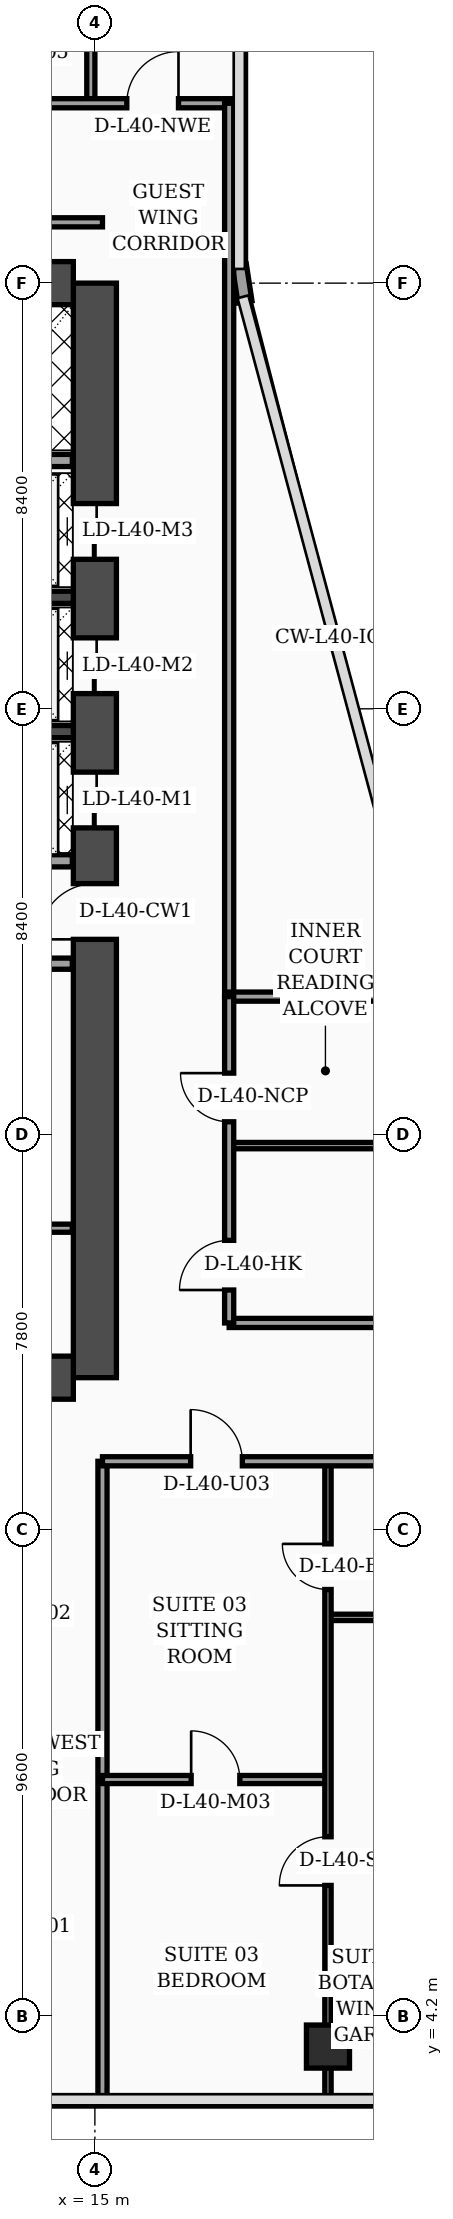
"""IFC4 building model, lengths in metres.
Left out: names, types, materials, properties, quantities, classifications, styles, units other than length and angle.
Written with IfcOpenShell. Run it as: python <this file> out.ifc"""

import sys

from ifc_helpers import new_model, si_unit, direction, frame, frame_2d, origin, origin_2d, place, context, subcontext, project, spatial, rectangle, hollow_rectangle, extrude, element, fill, save


model = new_model("IFC4")
c1 = context("Model", 3, precision=1e-05, world=origin(), true_north=direction((0.0, 1.0)))
c2 = subcontext(c1, "Body", "Model", "MODEL_VIEW")
j1 = project(units=[si_unit("LENGTHUNIT", "METRE"), si_unit("PLANEANGLEUNIT", "RADIAN")], contexts=[c1])
p1 = place(None, origin())
s1 = spatial("IfcSite", under=j1, at=p1, CompositionType="ELEMENT")
p2 = place(p1, origin())
s2 = spatial("IfcBuilding", under=s1, at=p2, CompositionType="ELEMENT")
p3 = place(p2, frame((0.0, 0.0, 163.7)))
s3 = spatial("IfcBuildingStorey", under=s2, at=p3, CompositionType="ELEMENT", Elevation=163.7)
p4 = place(p3, frame((15.0, 16.8, 0.0), z_axis=(0.0, 0.0, 1.0), x_axis=(0.0, 1.0, 0.0)))
e1 = element("IfcWall", 1, at=p4, inside=s3, PredefinedType="SHEAR", context=c2, shape_type="SweptSolid", body=[
    extrude(rectangle(XDim=21.6, YDim=0.85, at=frame_2d((10.8, 0.0))), origin(), (0.0, 0.0, 1.0), 3.56),
])
p5 = place(p4, frame((8.65, 0.0, 0.0)))
e2 = element("IfcOpeningElement", 2, at=p5, cuts=e1, PredefinedType="OPENING", context=c2, shape_type="SweptSolid", body=[
    extrude(rectangle(XDim=1.1, YDim=2.2, at=frame_2d((0.55, 1.1))), frame((0.0, 0.435, 0.0), z_axis=(0.0, -1.0, 0.0), x_axis=(1.0, 0.0, 0.0)), (0.0, 0.0, 1.0), 0.87),
])
p6 = place(p4, frame((10.85, 0.0, 0.0)))
e3 = element("IfcOpeningElement", 3, at=p6, cuts=e1, PredefinedType="OPENING", context=c2, shape_type="SweptSolid", body=[
    extrude(rectangle(XDim=1.1, YDim=2.2, at=frame_2d((0.55, 1.1))), frame((0.0, 0.435, 0.0), z_axis=(0.0, -1.0, 0.0), x_axis=(1.0, 0.0, 0.0)), (0.0, 0.0, 1.0), 0.87),
])
p7 = place(p4, frame((13.5, 0.0, 0.0)))
e4 = element("IfcOpeningElement", 4, at=p7, cuts=e1, PredefinedType="OPENING", context=c2, shape_type="SweptSolid", body=[
    extrude(rectangle(XDim=1.1, YDim=2.2, at=frame_2d((0.55, 1.1))), frame((0.0, 0.435, 0.0), z_axis=(0.0, -1.0, 0.0), x_axis=(1.0, 0.0, 0.0)), (0.0, 0.0, 1.0), 0.87),
])
p8 = place(p4, frame((16.15, 0.0, 0.0)))
e5 = element("IfcOpeningElement", 5, at=p8, cuts=e1, PredefinedType="OPENING", context=c2, shape_type="SweptSolid", body=[
    extrude(rectangle(XDim=1.1, YDim=2.2, at=frame_2d((0.55, 1.1))), frame((0.0, 0.435, 0.0), z_axis=(0.0, -1.0, 0.0), x_axis=(1.0, 0.0, 0.0)), (0.0, 0.0, 1.0), 0.87),
])
for number, where, z_axis, x_axis in (
    (6, (4.625, 38.4, 0.0), (0.0, 0.0, 1.0), (1.0, 0.0, 0.0)),
    (7, (4.625, 16.8, 0.0), (0.0, 0.0, 1.0), (1.0, 0.0, 0.0)),
):
    element("IfcWall", number, at=place(p3, frame(where, z_axis=z_axis, x_axis=x_axis)), inside=s3, PredefinedType="SHEAR", context=c2, shape_type="SweptSolid", body=[
        extrude(rectangle(XDim=9.95, YDim=0.85, at=frame_2d((4.975, 0.0))), origin(), (0.0, 0.0, 1.0), 3.56),
    ])
for number, where, z_axis, x_axis in (
    (8, (12.18, 29.55, 0.0), (0.0, 0.0, 1.0), (1.0, 0.0, 0.0)),
    (9, (12.18, 32.2, 0.0), (0.0, 0.0, 1.0), (1.0, 0.0, 0.0)),
):
    element("IfcWall", number, at=place(p3, frame(where, z_axis=z_axis, x_axis=x_axis)), inside=s3, PredefinedType="SOLIDWALL", context=c2, shape_type="SweptSolid", body=[
        extrude(rectangle(XDim=2.395, YDim=0.24, at=frame_2d((1.198, 0.0))), origin(), (0.0, 0.0, 1.0), 3.56),
    ])
p9 = place(p3, frame((19.6, 3.6, 0.0), z_axis=(0.0, 0.0, 1.0), x_axis=(1.0, 0.0, 0.0)))
e10 = element("IfcColumn", 10, at=p9, inside=s3, PredefinedType="COLUMN", context=c2, shape_type="SweptSolid", body=[
    extrude(hollow_rectangle(XDim=0.85, YDim=0.85, WallThickness=0.036, at=origin_2d()), origin(), (0.0, 0.0, 1.0), 3.56),
])
p10 = place(p3, frame((17.962, 38.03, 0.0), z_axis=(0.0, 0.0, 1.0), x_axis=(-0.15141125477, 0.988470855377, 0.0)))
e11 = element("IfcWall", 11, at=p10, inside=s3, PredefinedType="SOLIDWALL", context=c2, shape_type="SweptSolid", body=[
    extrude(rectangle(XDim=0.739, YDim=0.28, at=frame_2d((0.369, 0.0))), origin(), (0.0, 0.0, 1.0), 3.56),
])
p11 = place(p3, frame((9.68, 19.75, 0.0), z_axis=(0.0, 0.0, 1.0), x_axis=(1.0, 0.0, 0.0)))
e12 = element("IfcWall", 12, at=p11, inside=s3, PredefinedType="PARTITIONING", context=c2, shape_type="SweptSolid", body=[
    extrude(rectangle(XDim=4.875, YDim=0.16, at=frame_2d((2.438, 0.0))), origin(), (0.0, 0.0, 1.0), 3.56),
])
p12 = place(p11, frame((1.1, 0.0, 0.0)))
e13 = element("IfcOpeningElement", 13, at=p12, cuts=e12, PredefinedType="OPENING", context=c2, shape_type="SweptSolid", body=[
    extrude(rectangle(XDim=0.98, YDim=2.15, at=frame_2d((0.49, 1.075))), frame((0.0, 0.09, 0.0), z_axis=(0.0, -1.0, 0.0), x_axis=(1.0, 0.0, 0.0)), (0.0, 0.0, 1.0), 0.18),
])
p13 = place(p3, frame((9.68, 24.97, 0.0), z_axis=(0.0, 0.0, 1.0), x_axis=(1.0, 0.0, 0.0)))
e14 = element("IfcWall", 14, at=p13, inside=s3, PredefinedType="SOLIDWALL", context=c2, shape_type="SweptSolid", body=[
    extrude(rectangle(XDim=4.875, YDim=0.22, at=frame_2d((2.438, 0.0))), origin(), (0.0, 0.0, 1.0), 2.94),
])
p14 = place(p13, frame((0.9, 0.0, 0.0)))
e15 = element("IfcOpeningElement", 15, at=p14, cuts=e14, PredefinedType="OPENING", context=c2, shape_type="SweptSolid", body=[
    extrude(rectangle(XDim=0.98, YDim=2.15, at=frame_2d((0.49, 1.075))), frame((0.0, 0.12, 0.0), z_axis=(0.0, -1.0, 0.0), x_axis=(1.0, 0.0, 0.0)), (0.0, 0.0, 1.0), 0.24),
])
p15 = place(p3, frame((12.25, 27.0, 0.0), z_axis=(0.0, 0.0, 1.0), x_axis=(1.0, 0.0, 0.0)))
e16 = element("IfcWall", 16, at=p15, inside=s3, PredefinedType="SOLIDWALL", context=c2, shape_type="SweptSolid", body=[
    extrude(rectangle(XDim=2.305, YDim=0.24, at=frame_2d((1.152, 0.0))), origin(), (0.0, 0.0, 1.0), 3.56),
])
p16 = place(p3, frame((9.66, 34.9, 0.0), z_axis=(0.0, 0.0, 1.0), x_axis=(1.0, 0.0, 0.0)))
e17 = element("IfcWall", 17, at=p16, inside=s3, PredefinedType="SOLIDWALL", context=c2, shape_type="SweptSolid", body=[
    extrude(rectangle(XDim=4.895, YDim=0.24, at=frame_2d((2.448, 0.0))), origin(), (0.0, 0.0, 1.0), 3.56),
])
p17 = place(p3, frame((15.15, 2.44, 0.0), z_axis=(0.0, 0.0, 1.0), x_axis=(0.0, 1.0, 0.0)))
e18 = element("IfcWall", 18, at=p17, inside=s3, PredefinedType="PARTITIONING", context=c2, shape_type="SweptSolid", body=[
    extrude(rectangle(XDim=12.71, YDim=0.18, at=frame_2d((6.355, 0.0))), origin(), (0.0, 0.0, 1.0), 3.04),
])
p18 = place(p3, frame((19.6, 12.07, 0.0), z_axis=(0.0, 0.0, 1.0), x_axis=(1.0, 0.0, 0.0)))
e19 = element("IfcWall", 19, at=p18, inside=s3, PredefinedType="PARTITIONING", context=c2, shape_type="SweptSolid", body=[
    extrude(rectangle(XDim=2.0, YDim=0.125, at=frame_2d((1.0, 0.0))), origin(), (0.0, 0.0, 1.0), 3.56),
])
p19 = place(p3, frame((15.15, 8.87, 0.0), z_axis=(0.0, 0.0, 1.0), x_axis=(1.0, 0.0, 0.0)))
e20 = element("IfcWall", 20, at=p19, inside=s3, PredefinedType="PARTITIONING", context=c2, shape_type="SweptSolid", body=[
    extrude(rectangle(XDim=4.45, YDim=0.16, at=frame_2d((2.225, 0.0))), origin(), (0.0, 0.0, 1.0), 3.56),
])
p20 = place(p19, frame((1.75, 0.0, 0.0)))
e21 = element("IfcOpeningElement", 21, at=p20, cuts=e20, PredefinedType="OPENING", context=c2, shape_type="SweptSolid", body=[
    extrude(rectangle(XDim=0.96, YDim=2.2, at=frame_2d((0.48, 1.1))), frame((0.0, 0.09, 0.0), z_axis=(0.0, -1.0, 0.0), x_axis=(1.0, 0.0, 0.0)), (0.0, 0.0, 1.0), 0.18),
])
p21 = place(p3, frame((19.6, 2.44, 0.0), z_axis=(0.0, 0.0, 1.0), x_axis=(0.0, 1.0, 0.0)))
e22 = element("IfcWall", 22, at=p21, inside=s3, PredefinedType="PARTITIONING", context=c2, shape_type="SweptSolid", body=[
    extrude(rectangle(XDim=12.71, YDim=0.125, at=frame_2d((6.355, 0.0))), origin(), (0.0, 0.0, 1.0), 2.49),
])
p22 = place(p21, frame((4.34, 0.0, 0.0)))
e23 = element("IfcOpeningElement", 23, at=p22, cuts=e22, PredefinedType="OPENING", context=c2, shape_type="SweptSolid", body=[
    extrude(rectangle(XDim=0.96, YDim=2.2, at=frame_2d((0.48, 1.1))), frame((0.0, 0.073, 0.0), z_axis=(0.0, -1.0, 0.0), x_axis=(1.0, 0.0, 0.0)), (0.0, 0.0, 1.0), 0.145),
])
p23 = place(p21, frame((10.18, 0.0, 0.0)))
e24 = element("IfcOpeningElement", 24, at=p23, cuts=e22, PredefinedType="OPENING", context=c2, shape_type="SweptSolid", body=[
    extrude(rectangle(XDim=0.9, YDim=2.15, at=frame_2d((0.45, 1.075))), frame((0.0, 0.073, 0.0), z_axis=(0.0, -1.0, 0.0), x_axis=(1.0, 0.0, 0.0)), (0.0, 0.0, 1.0), 0.145),
])
p24 = place(p3, frame((15.15, 15.15, 0.0), z_axis=(0.0, 0.0, 1.0), x_axis=(1.0, 0.0, 0.0)))
e25 = element("IfcWall", 25, at=p24, inside=s3, PredefinedType="PARTITIONING", context=c2, shape_type="SweptSolid", body=[
    extrude(rectangle(XDim=6.45, YDim=0.18, at=frame_2d((3.225, 0.0))), origin(), (0.0, 0.0, 1.0), 2.49),
])
p25 = place(p24, frame((1.74, 0.0, 0.0)))
e26 = element("IfcOpeningElement", 26, at=p25, cuts=e25, PredefinedType="OPENING", context=c2, shape_type="SweptSolid", body=[
    extrude(rectangle(XDim=1.02, YDim=2.2, at=frame_2d((0.51, 1.1))), frame((0.0, 0.1, 0.0), z_axis=(0.0, -1.0, 0.0), x_axis=(1.0, 0.0, 0.0)), (0.0, 0.0, 1.0), 0.2),
])
p26 = place(p3, frame((14.92, 41.95, 0.0), z_axis=(0.0, 0.0, 1.0), x_axis=(0.0, 1.0, 0.0)))
e27 = element("IfcWall", 27, at=p26, inside=s3, PredefinedType="PARTITIONING", context=c2, shape_type="SweptSolid", body=[
    extrude(rectangle(XDim=5.85, YDim=0.16, at=frame_2d((2.925, 0.0))), origin(), (0.0, 0.0, 1.0), 3.04),
])
p27 = place(p3, frame((0.08, 41.95, 0.0), z_axis=(0.0, 0.0, 1.0), x_axis=(1.0, 0.0, 0.0)))
e28 = element("IfcWall", 28, at=p27, inside=s3, PredefinedType="PARTITIONING", context=c2, shape_type="SweptSolid", body=[
    extrude(rectangle(XDim=17.77, YDim=0.18, at=frame_2d((8.885, 0.0))), origin(), (0.0, 0.0, 1.0), 2.94),
])
p28 = place(p27, frame((0.9, 0.0, 0.0)))
e29 = element("IfcOpeningElement", 29, at=p28, cuts=e28, PredefinedType="OPENING", context=c2, shape_type="SweptSolid", body=[
    extrude(rectangle(XDim=1.02, YDim=2.2, at=frame_2d((0.51, 1.1))), frame((0.0, 0.1, 0.0), z_axis=(0.0, -1.0, 0.0), x_axis=(1.0, 0.0, 0.0)), (0.0, 0.0, 1.0), 0.2),
])
p29 = place(p27, frame((4.9, 0.0, 0.0)))
e30 = element("IfcOpeningElement", 30, at=p29, cuts=e28, PredefinedType="OPENING", context=c2, shape_type="SweptSolid", body=[
    extrude(rectangle(XDim=1.02, YDim=2.2, at=frame_2d((0.51, 1.1))), frame((0.0, 0.1, 0.0), z_axis=(0.0, -1.0, 0.0), x_axis=(1.0, 0.0, 0.0)), (0.0, 0.0, 1.0), 0.2),
])
p30 = place(p27, frame((10.78, 0.0, 0.0)))
e31 = element("IfcOpeningElement", 31, at=p30, cuts=e28, PredefinedType="OPENING", context=c2, shape_type="SweptSolid", body=[
    extrude(rectangle(XDim=1.02, YDim=2.2, at=frame_2d((0.51, 1.1))), frame((0.0, 0.1, 0.0), z_axis=(0.0, -1.0, 0.0), x_axis=(1.0, 0.0, 0.0)), (0.0, 0.0, 1.0), 0.2),
])
p31 = place(p27, frame((15.55, 0.0, 0.0)))
e32 = element("IfcOpeningElement", 32, at=p31, cuts=e28, PredefinedType="OPENING", context=c2, shape_type="SweptSolid", body=[
    extrude(rectangle(XDim=1.02, YDim=2.2, at=frame_2d((0.51, 1.1))), frame((0.0, 0.1, 0.0), z_axis=(0.0, -1.0, 0.0), x_axis=(1.0, 0.0, 0.0)), (0.0, 0.0, 1.0), 0.2),
])
p32 = place(p3, frame((17.65, 24.3, 0.0), z_axis=(0.0, 0.0, 1.0), x_axis=(0.0, 1.0, 0.0)))
e33 = element("IfcWall", 33, at=p32, inside=s3, PredefinedType="PARTITIONING", context=c2, shape_type="SweptSolid", body=[
    extrude(rectangle(XDim=17.65, YDim=0.18, at=frame_2d((8.825, 0.0))), origin(), (0.0, 0.0, 1.0), 2.94),
])
p33 = place(p3, frame((3.755, 39.6, 0.0), z_axis=(0.0, 0.0, 1.0), x_axis=(1.0, 0.0, 0.0)))
e34 = element("IfcWall", 34, at=p33, inside=s3, PredefinedType="PARTITIONING", context=c2, shape_type="SweptSolid", body=[
    extrude(rectangle(XDim=11.395, YDim=0.18, at=frame_2d((5.698, 0.0))), origin(), (0.0, 0.0, 1.0), 2.94),
])
p34 = place(p3, frame((17.65, 17.88, 0.0), z_axis=(0.0, 0.0, 1.0), x_axis=(1.0, 0.0, 0.0)))
e35 = element("IfcWall", 35, at=p34, inside=s3, PredefinedType="PARTITIONING", context=c2, shape_type="SweptSolid", body=[
    extrude(rectangle(XDim=3.9, YDim=0.18, at=frame_2d((1.95, 0.0))), origin(), (0.0, 0.0, 1.0), 3.56),
])
p35 = place(p3, frame((17.65, 21.38, 0.0), z_axis=(0.0, 0.0, 1.0), x_axis=(1.0, 0.0, 0.0)))
e36 = element("IfcWall", 36, at=p35, inside=s3, PredefinedType="PARTITIONING", context=c2, shape_type="SweptSolid", body=[
    extrude(rectangle(XDim=3.9, YDim=0.125, at=frame_2d((1.95, 0.0))), origin(), (0.0, 0.0, 1.0), 3.56),
])
p36 = place(p3, frame((17.65, 24.32, 0.0), z_axis=(0.0, 0.0, 1.0), x_axis=(1.0, 0.0, 0.0)))
e37 = element("IfcWall", 37, at=p36, inside=s3, PredefinedType="PARTITIONING", context=c2, shape_type="SweptSolid", body=[
    extrude(rectangle(XDim=3.95, YDim=0.18, at=frame_2d((1.975, 0.0))), origin(), (0.0, 0.0, 1.0), 3.56),
])
p37 = place(p3, frame((17.65, 17.88, 0.0), z_axis=(0.0, 0.0, 1.0), x_axis=(0.0, 1.0, 0.0)))
e38 = element("IfcWall", 38, at=p37, inside=s3, PredefinedType="PARTITIONING", context=c2, shape_type="SweptSolid", body=[
    extrude(rectangle(XDim=6.44, YDim=0.18, at=frame_2d((3.22, 0.0))), origin(), (0.0, 0.0, 1.0), 3.56),
])
p38 = place(p37, frame((0.65, 0.0, 0.0)))
e39 = element("IfcOpeningElement", 39, at=p38, cuts=e38, PredefinedType="OPENING", context=c2, shape_type="SweptSolid", body=[
    extrude(rectangle(XDim=0.98, YDim=2.15, at=frame_2d((0.49, 1.075))), frame((0.0, 0.1, 0.0), z_axis=(0.0, -1.0, 0.0), x_axis=(1.0, 0.0, 0.0)), (0.0, 0.0, 1.0), 0.2),
])
p39 = place(p37, frame((3.97, 0.0, 0.0)))
e40 = element("IfcOpeningElement", 40, at=p39, cuts=e38, PredefinedType="OPENING", context=c2, shape_type="SweptSolid", body=[
    extrude(rectangle(XDim=0.96, YDim=2.2, at=frame_2d((0.48, 1.1))), frame((0.0, 0.1, 0.0), z_axis=(0.0, -1.0, 0.0), x_axis=(1.0, 0.0, 0.0)), (0.0, 0.0, 1.0), 0.2),
])
p40 = place(p20, origin())
e41 = element("IfcDoor", 41, at=p40, inside=s3, OperationType="SINGLE_SWING_LEFT", PredefinedType="DOOR", context=c2, shape_type="SweptSolid", body=[
    extrude(rectangle(XDim=0.96, YDim=2.2, at=frame_2d((0.48, 1.1))), frame((0.0, 0.025, 0.0), z_axis=(0.0, -1.0, 0.0), x_axis=(1.0, 0.0, 0.0)), (0.0, 0.0, 1.0), 0.05),
])
fill(e21, e41)
p41 = place(p22, origin())
e42 = element("IfcDoor", 42, at=p41, inside=s3, OperationType="SINGLE_SWING_LEFT", PredefinedType="DOOR", context=c2, shape_type="SweptSolid", body=[
    extrude(rectangle(XDim=0.96, YDim=2.2, at=frame_2d((0.48, 1.1))), frame((0.0, 0.025, 0.0), z_axis=(0.0, -1.0, 0.0), x_axis=(1.0, 0.0, 0.0)), (0.0, 0.0, 1.0), 0.05),
])
fill(e23, e42)
p42 = place(p23, origin())
e43 = element("IfcDoor", 43, at=p42, inside=s3, OperationType="SINGLE_SWING_RIGHT", PredefinedType="DOOR", context=c2, shape_type="SweptSolid", body=[
    extrude(rectangle(XDim=0.9, YDim=2.15, at=frame_2d((0.45, 1.075))), frame((0.0, 0.025, 0.0), z_axis=(0.0, -1.0, 0.0), x_axis=(1.0, 0.0, 0.0)), (0.0, 0.0, 1.0), 0.05),
])
fill(e24, e43)
p43 = place(p25, origin())
e44 = element("IfcDoor", 44, at=p43, inside=s3, OperationType="SINGLE_SWING_LEFT", PredefinedType="DOOR", context=c2, shape_type="SweptSolid", body=[
    extrude(rectangle(XDim=1.02, YDim=2.2, at=frame_2d((0.51, 1.1))), frame((0.0, 0.025, 0.0), z_axis=(0.0, -1.0, 0.0), x_axis=(1.0, 0.0, 0.0)), (0.0, 0.0, 1.0), 0.05),
])
fill(e26, e44)
p44 = place(p31, origin())
e45 = element("IfcDoor", 45, at=p44, inside=s3, OperationType="SINGLE_SWING_RIGHT", PredefinedType="DOOR", context=c2, shape_type="SweptSolid", body=[
    extrude(rectangle(XDim=1.02, YDim=2.2, at=frame_2d((0.51, 1.1))), frame((0.0, 0.025, 0.0), z_axis=(0.0, -1.0, 0.0), x_axis=(1.0, 0.0, 0.0)), (0.0, 0.0, 1.0), 0.05),
])
fill(e32, e45)
p45 = place(p38, origin())
e46 = element("IfcDoor", 46, at=p45, inside=s3, OperationType="SINGLE_SWING_LEFT", PredefinedType="DOOR", context=c2, shape_type="SweptSolid", body=[
    extrude(rectangle(XDim=0.98, YDim=2.15, at=frame_2d((0.49, 1.075))), frame((0.0, 0.025, 0.0), z_axis=(0.0, -1.0, 0.0), x_axis=(1.0, 0.0, 0.0)), (0.0, 0.0, 1.0), 0.05),
])
fill(e39, e46)
p46 = place(p39, origin())
e47 = element("IfcDoor", 47, at=p46, inside=s3, OperationType="SINGLE_SWING_RIGHT", PredefinedType="DOOR", context=c2, shape_type="SweptSolid", body=[
    extrude(rectangle(XDim=0.96, YDim=2.2, at=frame_2d((0.48, 1.1))), frame((0.0, 0.025, 0.0), z_axis=(0.0, -1.0, 0.0), x_axis=(1.0, 0.0, 0.0)), (0.0, 0.0, 1.0), 0.05),
])
fill(e40, e47)
p47 = place(p5, origin())
e48 = element("IfcDoor", 48, at=p47, inside=s3, OperationType="SINGLE_SWING_LEFT", PredefinedType="DOOR", context=c2, shape_type="SweptSolid", body=[
    extrude(rectangle(XDim=1.1, YDim=2.2, at=frame_2d((0.55, 1.1))), frame((0.0, 0.025, 0.0), z_axis=(0.0, -1.0, 0.0), x_axis=(1.0, 0.0, 0.0)), (0.0, 0.0, 1.0), 0.05),
])
fill(e2, e48)
p48 = place(p6, origin())
e49 = element("IfcDoor", 49, at=p48, inside=s3, OperationType="DOUBLE_DOOR_SLIDING", PredefinedType="DOOR", context=c2, shape_type="SweptSolid", body=[
    extrude(rectangle(XDim=1.1, YDim=2.2, at=frame_2d((0.55, 1.1))), frame((0.0, 0.025, 0.0), z_axis=(0.0, -1.0, 0.0), x_axis=(1.0, 0.0, 0.0)), (0.0, 0.0, 1.0), 0.05),
])
fill(e3, e49)
p49 = place(p7, origin())
e50 = element("IfcDoor", 50, at=p49, inside=s3, OperationType="DOUBLE_DOOR_SLIDING", PredefinedType="DOOR", context=c2, shape_type="SweptSolid", body=[
    extrude(rectangle(XDim=1.1, YDim=2.2, at=frame_2d((0.55, 1.1))), frame((0.0, 0.025, 0.0), z_axis=(0.0, -1.0, 0.0), x_axis=(1.0, 0.0, 0.0)), (0.0, 0.0, 1.0), 0.05),
])
fill(e4, e50)
p50 = place(p8, origin())
e51 = element("IfcDoor", 51, at=p50, inside=s3, OperationType="DOUBLE_DOOR_SLIDING", PredefinedType="DOOR", context=c2, shape_type="SweptSolid", body=[
    extrude(rectangle(XDim=1.1, YDim=2.2, at=frame_2d((0.55, 1.1))), frame((0.0, 0.025, 0.0), z_axis=(0.0, -1.0, 0.0), x_axis=(1.0, 0.0, 0.0)), (0.0, 0.0, 1.0), 0.05),
])
fill(e5, e51)
save(model, sys.argv[1])
